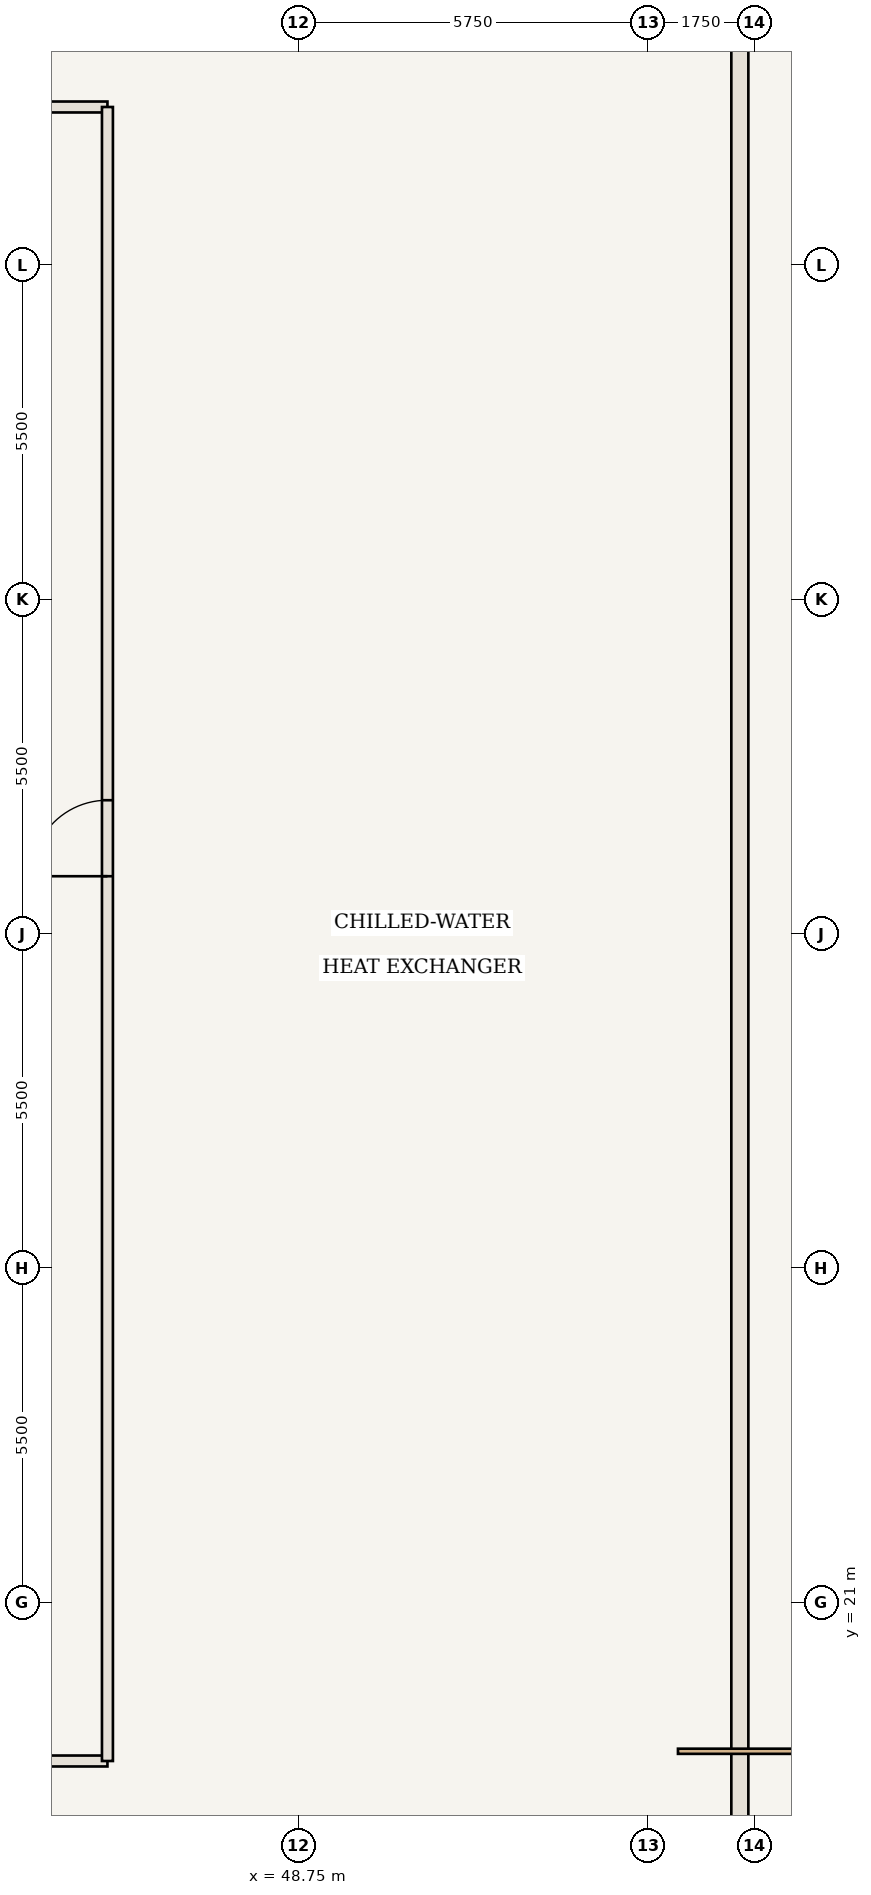
"""IFC4 building model, lengths in metres.
Left out: names, types, materials, properties, quantities, classifications, styles, units other than length and angle.
Written with IfcOpenShell. Run it as: python <this file> out.ifc"""

import sys

from ifc_helpers import new_model, si_unit, direction, frame, frame_2d, origin, place, context, subcontext, project, spatial, rectangle, extrude, element, fill, save


model = new_model("IFC4")
c1 = context("Model", 3, precision=1e-05, world=origin(), true_north=direction((0.0, 1.0)))
c2 = subcontext(c1, "Body", "Model", "MODEL_VIEW")
j1 = project(units=[si_unit("LENGTHUNIT", "METRE"), si_unit("PLANEANGLEUNIT", "RADIAN")], contexts=[c1])
p1 = place(None, origin())
s1 = spatial("IfcSite", under=j1, at=p1, CompositionType="ELEMENT")
p2 = place(p1, origin())
s2 = spatial("IfcBuilding", under=s1, at=p2, CompositionType="ELEMENT")
p3 = place(p2, frame((0.0, 0.0, 99.75)))
s3 = spatial("IfcBuildingStorey", under=s2, at=p3, CompositionType="ELEMENT", Elevation=99.75)
p4 = place(p3, frame((18.4, 18.4, 0.0), z_axis=(0.0, 0.0, 1.0), x_axis=(1.0, 0.0, 0.0)))
e1 = element("IfcWall", 1, at=p4, inside=s3, PredefinedType="STANDARD", context=c2, shape_type="SweptSolid", body=[
    extrude(rectangle(XDim=27.2, YDim=0.18, at=frame_2d((13.6, 0.0))), origin(), (0.0, 0.0, 1.0), 5.88),
])
p5 = place(p4, frame((4.4, 0.0, 0.0)))
e2 = element("IfcOpeningElement", 2, at=p5, cuts=e1, PredefinedType="OPENING", context=c2, shape_type="SweptSolid", body=[
    extrude(rectangle(XDim=1.25, YDim=2.2, at=frame_2d((0.625, 1.1))), frame((0.0, 0.1, 0.0), z_axis=(0.0, -1.0, 0.0), x_axis=(1.0, 0.0, 0.0)), (0.0, 0.0, 1.0), 0.2),
])
p6 = place(p3, frame((18.4, 45.6, 0.0), z_axis=(0.0, 0.0, 1.0), x_axis=(1.0, 0.0, 0.0)))
e3 = element("IfcWall", 3, at=p6, inside=s3, PredefinedType="STANDARD", context=c2, shape_type="SweptSolid", body=[
    extrude(rectangle(XDim=27.2, YDim=0.18, at=frame_2d((13.6, 0.0))), origin(), (0.0, 0.0, 1.0), 5.88),
])
p7 = place(p6, frame((4.4, 0.0, 0.0)))
e4 = element("IfcOpeningElement", 4, at=p7, cuts=e3, PredefinedType="OPENING", context=c2, shape_type="SweptSolid", body=[
    extrude(rectangle(XDim=1.25, YDim=2.2, at=frame_2d((0.625, 1.1))), frame((0.0, 0.1, 0.0), z_axis=(0.0, -1.0, 0.0), x_axis=(1.0, 0.0, 0.0)), (0.0, 0.0, 1.0), 0.2),
])
p8 = place(p3, frame((45.6, 18.4, 0.0), z_axis=(0.0, 0.0, 1.0), x_axis=(0.0, 1.0, 0.0)))
e5 = element("IfcWall", 5, at=p8, inside=s3, PredefinedType="STANDARD", context=c2, shape_type="SweptSolid", body=[
    extrude(rectangle(XDim=27.2, YDim=0.18, at=frame_2d((13.6, 0.0))), origin(), (0.0, 0.0, 1.0), 5.88),
])
p9 = place(p8, frame((14.55, 0.0, 0.0)))
e6 = element("IfcOpeningElement", 6, at=p9, cuts=e5, PredefinedType="OPENING", context=c2, shape_type="SweptSolid", body=[
    extrude(rectangle(XDim=1.25, YDim=2.2, at=frame_2d((0.625, 1.1))), frame((0.0, 0.1, 0.0), z_axis=(0.0, -1.0, 0.0), x_axis=(1.0, 0.0, 0.0)), (0.0, 0.0, 1.0), 0.2),
])
p10 = place(p3, frame((56.0, 56.0, 0.0), z_axis=(0.0, 0.0, 1.0), x_axis=(0.0, -1.0, 0.0)))
e7 = element("IfcWall", 7, at=p10, inside=s3, PredefinedType="USERDEFINED", context=c2, shape_type="SweptSolid", body=[
    extrude(rectangle(XDim=48.0, YDim=0.28, at=frame_2d((24.0, 0.0))), origin(), (0.0, 0.0, 1.0), 3.88),
])
p11 = place(p9, origin())
e8 = element("IfcDoor", 8, at=p11, inside=s3, OperationType="SINGLE_SWING_LEFT", PredefinedType="DOOR", context=c2, shape_type="SweptSolid", body=[
    extrude(rectangle(XDim=1.25, YDim=2.2, at=frame_2d((0.625, 1.1))), frame((0.0, 0.025, 0.0), z_axis=(0.0, -1.0, 0.0), x_axis=(1.0, 0.0, 0.0)), (0.0, 0.0, 1.0), 0.05),
])
fill(e6, e8)
save(model, sys.argv[1])
